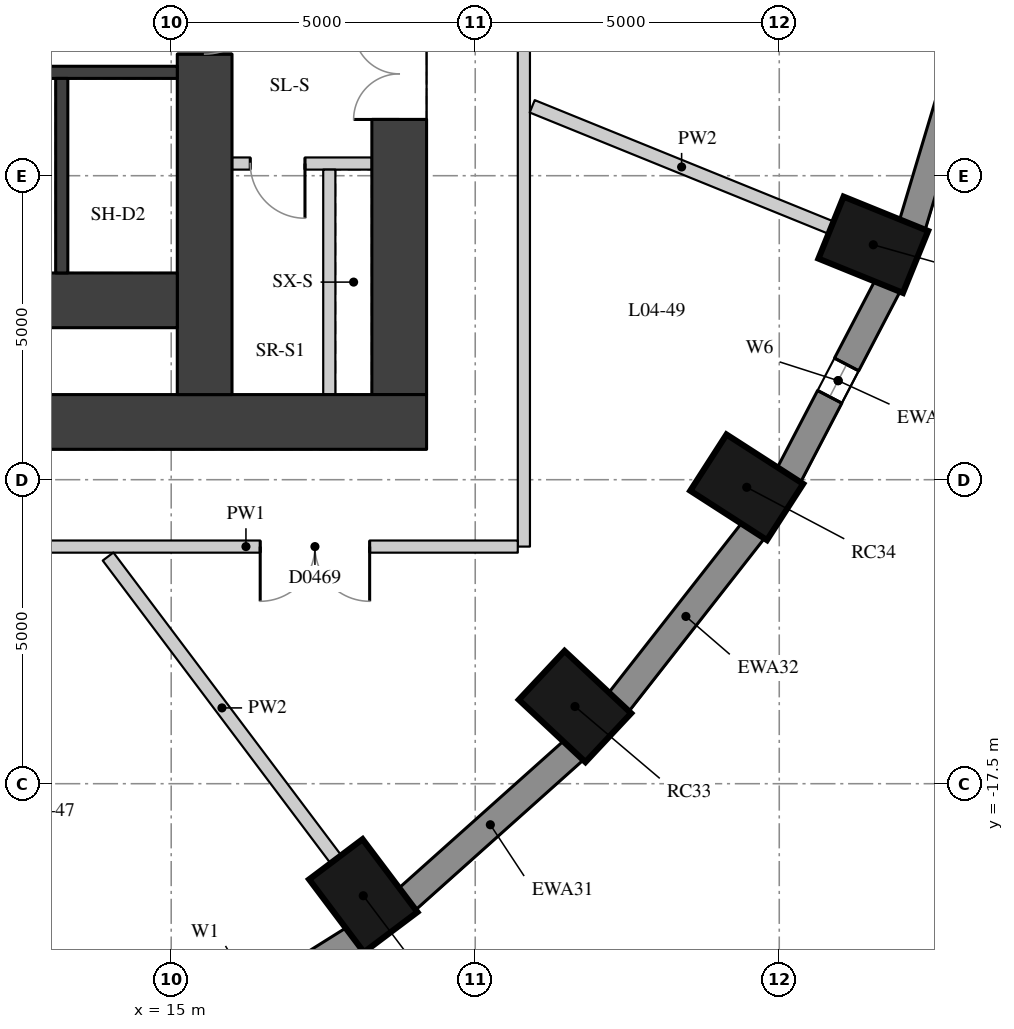
"""IFC4 building model, lengths in metres.
Left out: names, types, materials, properties, quantities, classifications, styles, units other than length and angle.
Written with IfcOpenShell. Run it as: python <this file> out.ifc"""

import sys

from ifc_helpers import new_model, si_unit, direction, frame, frame_2d, origin, origin_2d, place, context, subcontext, project, spatial, rectangle, extrude, element, fill, save


model = new_model("IFC4")
c1 = context("Model", 3, precision=1e-05, world=origin(), true_north=direction((0.0, 1.0)))
c2 = subcontext(c1, "Body", "Model", "MODEL_VIEW")
j1 = project(units=[si_unit("LENGTHUNIT", "METRE"), si_unit("PLANEANGLEUNIT", "RADIAN")], contexts=[c1])
p1 = place(None, origin())
s1 = spatial("IfcSite", under=j1, at=p1, CompositionType="ELEMENT")
p2 = place(p1, origin())
s2 = spatial("IfcBuilding", under=s1, at=p2, CompositionType="ELEMENT")
p3 = place(p2, frame((0.0, 0.0, 21.7)))
s3 = spatial("IfcBuildingStorey", under=s2, at=p3, CompositionType="ELEMENT", Elevation=21.7)
for number, where, z_axis, x_axis in (
    (1, (18.159, -19.343, 0.0), (0.0, 0.0, 1.0), (0.601, -0.799, 0.0)),
    (2, (21.641, -16.23, 0.0), (0.0, 0.0, 1.0), (0.73, -0.683, 0.0)),
    (3, (24.465, -12.625, 0.0), (0.0, 0.0, 1.0), (0.841, -0.541, 0.0)),
    (4, (26.546, -8.636, 0.0), (0.0, 0.0, 1.0), (0.927, -0.376, 0.0)),
):
    element("IfcColumn", number, at=place(p3, frame(where, z_axis=z_axis, x_axis=x_axis)), inside=s3, PredefinedType="COLUMN", context=c2, shape_type="SweptSolid", body=[
        extrude(rectangle(XDim=1.5, YDim=1.1, at=origin_2d()), origin(), (0.0, 0.0, 1.0), 3.3),
    ])
p4 = place(p3, frame((14.817, -22.051, 0.0), z_axis=(0.0, 0.0, 1.0), x_axis=(0.847635480093, 0.530579016629, 0.0)))
e5 = element("IfcWall", 5, at=p4, inside=s3, PredefinedType="SOLIDWALL", context=c2, shape_type="SweptSolid", body=[
    extrude(rectangle(XDim=3.782, YDim=0.45, at=frame_2d((1.891, 0.0))), origin(), (0.0, 0.0, 1.0), 3.02),
])
p5 = place(p4, frame((0.791, 0.0, 0.4)))
e6 = element("IfcOpeningElement", 6, at=p5, cuts=e5, PredefinedType="OPENING", context=c2, shape_type="SweptSolid", body=[
    extrude(rectangle(XDim=2.2, YDim=1.75, at=frame_2d((1.1, 0.875))), frame((0.0, 0.235, 0.0), z_axis=(0.0, -1.0, 0.0), x_axis=(1.0, 0.0, 0.0)), (0.0, 0.0, 1.0), 0.47),
])
p6 = place(p3, frame((18.871, -19.407, 0.0), z_axis=(0.0, 0.0, 1.0), x_axis=(0.745526233716, 0.66647628228, 0.0)))
e7 = element("IfcWall", 7, at=p6, inside=s3, PredefinedType="SOLIDWALL", context=c2, shape_type="SweptSolid", body=[
    extrude(rectangle(XDim=3.697, YDim=0.45, at=frame_2d((1.848, 0.0))), origin(), (0.0, 0.0, 1.0), 3.02),
])
p7 = place(p3, frame((22.352, -16.17, 0.0), z_axis=(0.0, 0.0, 1.0), x_axis=(0.616661975264, 0.787228053529, 0.0)))
e8 = element("IfcWall", 8, at=p7, inside=s3, PredefinedType="SOLIDWALL", context=c2, shape_type="SweptSolid", body=[
    extrude(rectangle(XDim=3.61, YDim=0.45, at=frame_2d((1.805, 0.0))), origin(), (0.0, 0.0, 1.0), 3.02),
])
p8 = place(p3, frame((25.152, -12.437, 0.0), z_axis=(0.0, 0.0, 1.0), x_axis=(0.462492775226, 0.886623050041, 0.0)))
e9 = element("IfcWall", 9, at=p8, inside=s3, PredefinedType="SOLIDWALL", context=c2, shape_type="SweptSolid", body=[
    extrude(rectangle(XDim=3.532, YDim=0.45, at=frame_2d((1.766, 0.0))), origin(), (0.0, 0.0, 1.0), 3.02),
])
p9 = place(p8, frame((1.466, 0.0, 0.4)))
e10 = element("IfcOpeningElement", 10, at=p9, cuts=e9, PredefinedType="OPENING", context=c2, shape_type="SweptSolid", body=[
    extrude(rectangle(XDim=0.6, YDim=1.75, at=frame_2d((0.3, 0.875))), frame((0.0, 0.235, 0.0), z_axis=(0.0, -1.0, 0.0), x_axis=(1.0, 0.0, 0.0)), (0.0, 0.0, 1.0), 0.47),
])
p10 = place(p3, frame((27.185, -8.323, 0.0), z_axis=(0.0, 0.0, 1.0), x_axis=(0.287064133733, 0.957911364963, 0.0)))
e11 = element("IfcWall", 11, at=p10, inside=s3, PredefinedType="SOLIDWALL", context=c2, shape_type="SweptSolid", body=[
    extrude(rectangle(XDim=3.473, YDim=0.45, at=frame_2d((1.737, 0.0))), origin(), (0.0, 0.0, 1.0), 3.02),
])
p11 = place(p3, frame((18.75, -11.1, 0.0), z_axis=(0.0, 0.0, 1.0), x_axis=(0.0, 1.0, 0.0)))
e12 = element("IfcWall", 12, at=p11, inside=s3, PredefinedType="SHEAR", context=c2, shape_type="SweptSolid", body=[
    extrude(rectangle(XDim=22.2, YDim=0.9, at=frame_2d((11.1, 0.0))), origin(), (0.0, 0.0, 1.0), 3.02),
])
p12 = place(p11, frame((15.925, 0.0, 0.0)))
e13 = element("IfcOpeningElement", 13, at=p12, cuts=e12, PredefinedType="OPENING", context=c2, shape_type="SweptSolid", body=[
    extrude(rectangle(XDim=1.5, YDim=2.1, at=frame_2d((0.75, 1.05))), frame((0.0, 0.46, 0.0), z_axis=(0.0, -1.0, 0.0), x_axis=(1.0, 0.0, 0.0)), (0.0, 0.0, 1.0), 0.92),
])
p13 = place(p11, frame((4.525, 0.0, 0.0)))
e14 = element("IfcOpeningElement", 14, at=p13, cuts=e12, PredefinedType="OPENING", context=c2, shape_type="SweptSolid", body=[
    extrude(rectangle(XDim=1.5, YDim=2.1, at=frame_2d((0.75, 1.05))), frame((0.0, 0.46, 0.0), z_axis=(0.0, -1.0, 0.0), x_axis=(1.0, 0.0, 0.0)), (0.0, 0.0, 1.0), 0.92),
])
p14 = place(p3, frame((4.0, -11.55, 0.0), z_axis=(0.0, 0.0, 1.0), x_axis=(1.0, 0.0, 0.0)))
e15 = element("IfcWall", 15, at=p14, inside=s3, PredefinedType="SHEAR", context=c2, shape_type="SweptSolid", body=[
    extrude(rectangle(XDim=15.2, YDim=0.9, at=frame_2d((7.6, 0.0))), origin(), (0.0, 0.0, 1.0), 3.02),
])
p15 = place(p3, frame((15.55, -11.1, 0.0), z_axis=(0.0, 0.0, 1.0), x_axis=(0.0, 1.0, 0.0)))
e16 = element("IfcWall", 16, at=p15, inside=s3, PredefinedType="SHEAR", context=c2, shape_type="SweptSolid", body=[
    extrude(rectangle(XDim=22.2, YDim=0.9, at=frame_2d((11.1, 0.0))), origin(), (0.0, 0.0, 1.0), 3.02),
])
p16 = place(p15, frame((15.6, 0.0, 0.0)))
e17 = element("IfcOpeningElement", 17, at=p16, cuts=e16, PredefinedType="OPENING", context=c2, shape_type="SweptSolid", body=[
    extrude(rectangle(XDim=1.0, YDim=2.1, at=frame_2d((0.5, 1.05))), frame((0.0, 0.46, 0.0), z_axis=(0.0, -1.0, 0.0), x_axis=(1.0, 0.0, 0.0)), (0.0, 0.0, 1.0), 0.92),
])
p17 = place(p15, frame((5.6, 0.0, 0.0)))
e18 = element("IfcOpeningElement", 18, at=p17, cuts=e16, PredefinedType="OPENING", context=c2, shape_type="SweptSolid", body=[
    extrude(rectangle(XDim=1.0, YDim=2.1, at=frame_2d((0.5, 1.05))), frame((0.0, 0.46, 0.0), z_axis=(0.0, -1.0, 0.0), x_axis=(1.0, 0.0, 0.0)), (0.0, 0.0, 1.0), 0.92),
])
p18 = place(p3, frame((4.9, -9.55, 0.0), z_axis=(0.0, 0.0, 1.0), x_axis=(1.0, 0.0, 0.0)))
e19 = element("IfcWall", 19, at=p18, inside=s3, PredefinedType="SHEAR", context=c2, shape_type="SweptSolid", body=[
    extrude(rectangle(XDim=10.2, YDim=0.9, at=frame_2d((5.1, 0.0))), origin(), (0.0, 0.0, 1.0), 3.02),
])
p19 = place(p3, frame((4.9, -5.8, 0.0), z_axis=(0.0, 0.0, 1.0), x_axis=(1.0, 0.0, 0.0)))
e20 = element("IfcWall", 20, at=p19, inside=s3, PredefinedType="SHEAR", context=c2, shape_type="SweptSolid", body=[
    extrude(rectangle(XDim=10.2, YDim=0.2, at=frame_2d((5.1, 0.0))), origin(), (0.0, 0.0, 1.0), 3.02),
])
p20 = place(p3, frame((13.2, -9.1, 0.0), z_axis=(0.0, 0.0, 1.0), x_axis=(0.0, 1.0, 0.0)))
e21 = element("IfcWall", 21, at=p20, inside=s3, PredefinedType="SHEAR", context=c2, shape_type="SweptSolid", body=[
    extrude(rectangle(XDim=3.2, YDim=0.2, at=frame_2d((1.6, 0.0))), origin(), (0.0, 0.0, 1.0), 3.02),
])
p21 = place(p3, frame((16.0, -7.3, 0.0), z_axis=(0.0, 0.0, 1.0), x_axis=(1.0, 0.0, 0.0)))
e22 = element("IfcWall", 22, at=p21, inside=s3, PredefinedType="PARTITIONING", context=c2, shape_type="SweptSolid", body=[
    extrude(rectangle(XDim=2.3, YDim=0.2, at=frame_2d((1.15, 0.0))), origin(), (0.0, 0.0, 1.0), 3.02),
])
p22 = place(p21, frame((0.3, 0.0, 0.0)))
e23 = element("IfcOpeningElement", 23, at=p22, cuts=e22, PredefinedType="OPENING", context=c2, shape_type="SweptSolid", body=[
    extrude(rectangle(XDim=0.9, YDim=2.1, at=frame_2d((0.45, 1.05))), frame((0.0, 0.11, 0.0), z_axis=(0.0, -1.0, 0.0), x_axis=(1.0, 0.0, 0.0)), (0.0, 0.0, 1.0), 0.22),
])
p23 = place(p3, frame((17.6, -11.1, 0.0), z_axis=(0.0, 0.0, 1.0), x_axis=(0.0, 1.0, 0.0)))
e24 = element("IfcWall", 24, at=p23, inside=s3, PredefinedType="PARTITIONING", context=c2, shape_type="SweptSolid", body=[
    extrude(rectangle(XDim=3.7, YDim=0.2, at=frame_2d((1.85, 0.0))), origin(), (0.0, 0.0, 1.0), 3.02),
])
p24 = place(p3, frame((20.8, 13.5, 0.0), z_axis=(0.0, 0.0, 1.0), x_axis=(0.0, -1.0, 0.0)))
e25 = element("IfcWall", 25, at=p24, inside=s3, PredefinedType="PARTITIONING", context=c2, shape_type="SweptSolid", body=[
    extrude(rectangle(XDim=27.1, YDim=0.2, at=frame_2d((13.55, 0.0))), origin(), (0.0, 0.0, 1.0), 3.02),
])
p25 = place(p24, frame((14.149, 0.0, 0.0)))
e26 = element("IfcOpeningElement", 26, at=p25, cuts=e25, PredefinedType="OPENING", context=c2, shape_type="SweptSolid", body=[
    extrude(rectangle(XDim=1.8, YDim=2.1, at=frame_2d((0.9, 1.05))), frame((0.0, 0.11, 0.0), z_axis=(0.0, -1.0, 0.0), x_axis=(1.0, 0.0, 0.0)), (0.0, 0.0, 1.0), 0.22),
])
p26 = place(p24, frame((5.864, 0.0, 0.0)))
e27 = element("IfcOpeningElement", 27, at=p26, cuts=e25, PredefinedType="OPENING", context=c2, shape_type="SweptSolid", body=[
    extrude(rectangle(XDim=1.8, YDim=2.1, at=frame_2d((0.9, 1.05))), frame((0.0, 0.11, 0.0), z_axis=(0.0, -1.0, 0.0), x_axis=(1.0, 0.0, 0.0)), (0.0, 0.0, 1.0), 0.22),
])
p27 = place(p3, frame((20.7, -13.6, 0.0), z_axis=(0.0, 0.0, 1.0), x_axis=(-1.0, 0.0, 0.0)))
e28 = element("IfcWall", 28, at=p27, inside=s3, PredefinedType="PARTITIONING", context=c2, shape_type="SweptSolid", body=[
    extrude(rectangle(XDim=8.941, YDim=0.2, at=frame_2d((4.471, 0.0))), origin(), (0.0, 0.0, 1.0), 3.02),
])
p28 = place(p27, frame((2.436, 0.0, 0.0)))
e29 = element("IfcOpeningElement", 29, at=p28, cuts=e28, PredefinedType="OPENING", context=c2, shape_type="SweptSolid", body=[
    extrude(rectangle(XDim=1.8, YDim=2.1, at=frame_2d((0.9, 1.05))), frame((0.0, 0.11, 0.0), z_axis=(0.0, -1.0, 0.0), x_axis=(1.0, 0.0, 0.0)), (0.0, 0.0, 1.0), 0.22),
])
p29 = place(p3, frame((17.708, -18.743, 0.0), z_axis=(0.0, 0.0, 1.0), x_axis=(-0.601177883261, 0.799115231164, 0.0)))
e30 = element("IfcWall", 30, at=p29, inside=s3, PredefinedType="PARTITIONING", context=c2, shape_type="SweptSolid", body=[
    extrude(rectangle(XDim=6.231, YDim=0.22, at=frame_2d((3.116, 0.0))), origin(), (0.0, 0.0, 1.0), 3.02),
])
p30 = place(p3, frame((25.851, -8.354, 0.0), z_axis=(0.0, 0.0, 1.0), x_axis=(-0.926546814299, 0.376179479653, 0.0)))
e31 = element("IfcWall", 31, at=p30, inside=s3, PredefinedType="PARTITIONING", context=c2, shape_type="SweptSolid", body=[
    extrude(rectangle(XDim=5.304, YDim=0.22, at=frame_2d((2.652, 0.0))), origin(), (0.0, 0.0, 1.0), 3.02),
])
p31 = place(p9, origin())
e32 = element("IfcWindow", 32, at=p31, inside=s3, PartitioningType="SINGLE_PANEL", PredefinedType="WINDOW", context=c2, shape_type="SweptSolid", body=[
    extrude(rectangle(XDim=0.6, YDim=1.75, at=frame_2d((0.3, 0.875))), frame((0.0, 0.035, 0.0), z_axis=(0.0, -1.0, 0.0), x_axis=(1.0, 0.0, 0.0)), (0.0, 0.0, 1.0), 0.06),
])
fill(e10, e32)
p32 = place(p13, origin())
e33 = element("IfcDoor", 33, at=p32, inside=s3, OperationType="DOUBLE_DOOR_SINGLE_SWING", PredefinedType="DOOR", context=c2, shape_type="SweptSolid", body=[
    extrude(rectangle(XDim=1.5, YDim=2.1, at=frame_2d((0.75, 1.05))), frame((0.0, 0.025, 0.0), z_axis=(0.0, -1.0, 0.0), x_axis=(1.0, 0.0, 0.0)), (0.0, 0.0, 1.0), 0.05),
])
fill(e14, e33)
p33 = place(p17, origin())
e34 = element("IfcDoor", 34, at=p33, inside=s3, OperationType="SINGLE_SWING_LEFT", PredefinedType="DOOR", context=c2, shape_type="SweptSolid", body=[
    extrude(rectangle(XDim=1.0, YDim=2.1, at=frame_2d((0.5, 1.05))), frame((0.0, 0.025, 0.0), z_axis=(0.0, -1.0, 0.0), x_axis=(1.0, 0.0, 0.0)), (0.0, 0.0, 1.0), 0.05),
])
fill(e18, e34)
p34 = place(p22, origin())
e35 = element("IfcDoor", 35, at=p34, inside=s3, OperationType="SINGLE_SWING_LEFT", PredefinedType="DOOR", context=c2, shape_type="SweptSolid", body=[
    extrude(rectangle(XDim=0.9, YDim=2.1, at=frame_2d((0.45, 1.05))), frame((0.0, 0.025, 0.0), z_axis=(0.0, -1.0, 0.0), x_axis=(1.0, 0.0, 0.0)), (0.0, 0.0, 1.0), 0.05),
])
fill(e23, e35)
p35 = place(p28, origin())
e36 = element("IfcDoor", 36, at=p35, inside=s3, OperationType="DOUBLE_DOOR_SINGLE_SWING", PredefinedType="DOOR", context=c2, shape_type="SweptSolid", body=[
    extrude(rectangle(XDim=1.8, YDim=2.1, at=frame_2d((0.9, 1.05))), frame((0.0, 0.025, 0.0), z_axis=(0.0, -1.0, 0.0), x_axis=(1.0, 0.0, 0.0)), (0.0, 0.0, 1.0), 0.05),
])
fill(e29, e36)
save(model, sys.argv[1])
